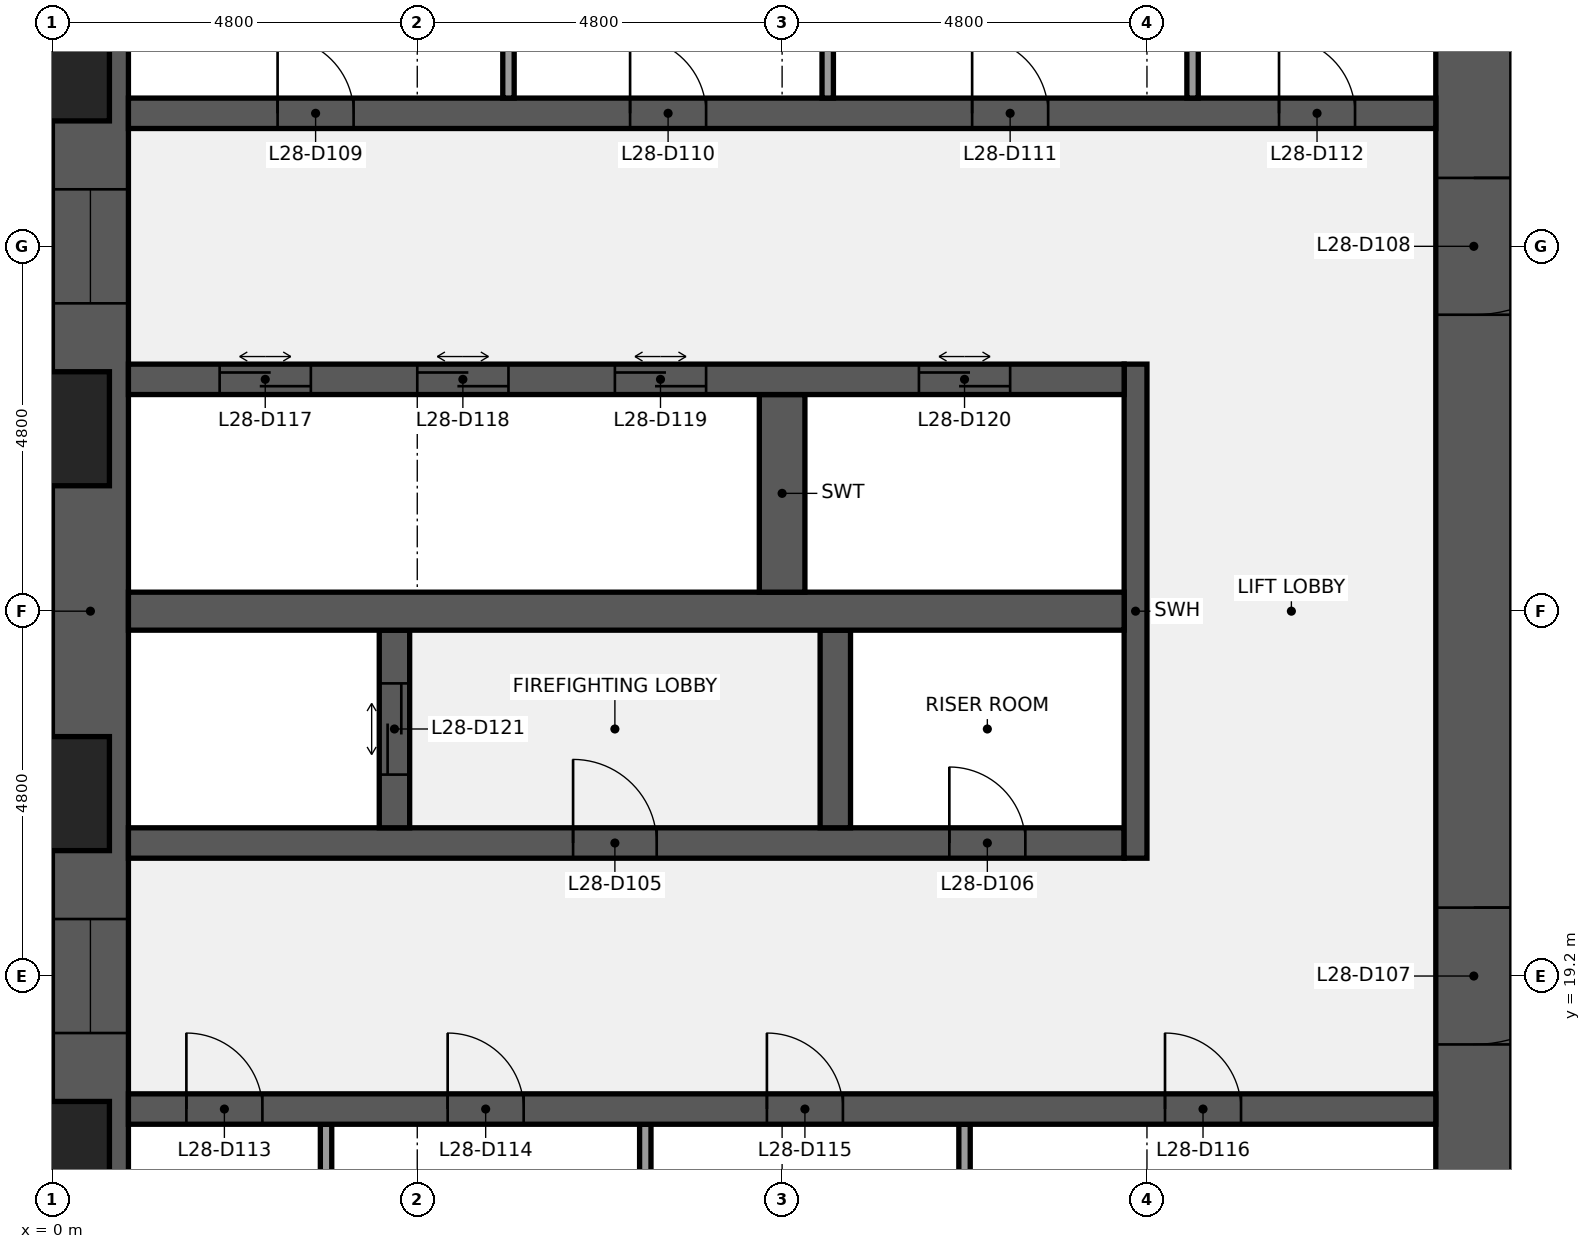
"""IFC4 building model, lengths in metres.
Left out: names, types, materials, properties, quantities, classifications, styles, units other than length and angle.
Written with IfcOpenShell. Run it as: python <this file> out.ifc"""

import sys

from ifc_helpers import new_model, si_unit, direction, frame, frame_2d, origin, place, context, subcontext, project, spatial, rectangle, extrude, element, fill, save


model = new_model("IFC4")
c1 = context("Model", 3, precision=1e-05, world=origin(), true_north=direction((0.0, 1.0)))
c2 = subcontext(c1, "Body", "Model", "MODEL_VIEW")
j1 = project(units=[si_unit("LENGTHUNIT", "METRE"), si_unit("PLANEANGLEUNIT", "RADIAN")], contexts=[c1])
p1 = place(None, origin())
s1 = spatial("IfcSite", under=j1, at=p1, CompositionType="ELEMENT")
p2 = place(p1, origin())
s2 = spatial("IfcBuilding", under=s1, at=p2, CompositionType="ELEMENT")
p3 = place(p2, frame((0.0, 0.0, 132.1)))
s3 = spatial("IfcBuildingStorey", under=s2, at=p3, CompositionType="ELEMENT", Elevation=132.1)
p4 = place(p3, frame((0.5, 9.6, 0.0), z_axis=(0.0, 0.0, 1.0), x_axis=(0.0, 1.0, 0.0)))
e1 = element("IfcWall", 1, at=p4, inside=s3, PredefinedType="SHEAR", context=c2, shape_type="SweptSolid", body=[
    extrude(rectangle(XDim=28.8, YDim=1.0, at=frame_2d((14.4, 0.0))), origin(), (0.0, 0.0, 1.0), 3.84),
])
p5 = place(p4, frame((8.85, 0.0, 0.9)))
e2 = element("IfcOpeningElement", 2, at=p5, cuts=e1, PredefinedType="OPENING", context=c2, shape_type="SweptSolid", body=[
    extrude(rectangle(XDim=1.5, YDim=1.5, at=frame_2d((0.75, 0.75))), frame((0.0, 0.51, 0.0), z_axis=(0.0, -1.0, 0.0), x_axis=(1.0, 0.0, 0.0)), (0.0, 0.0, 1.0), 1.02),
])
p6 = place(p4, frame((18.45, 0.0, 0.9)))
e3 = element("IfcOpeningElement", 3, at=p6, cuts=e1, PredefinedType="OPENING", context=c2, shape_type="SweptSolid", body=[
    extrude(rectangle(XDim=1.5, YDim=1.5, at=frame_2d((0.75, 0.75))), frame((0.0, 0.51, 0.0), z_axis=(0.0, -1.0, 0.0), x_axis=(1.0, 0.0, 0.0)), (0.0, 0.0, 1.0), 1.02),
])
p7 = place(p3, frame((18.7, 38.4, 0.0), z_axis=(0.0, 0.0, 1.0), x_axis=(0.0, -1.0, 0.0)))
e4 = element("IfcWall", 4, at=p7, inside=s3, PredefinedType="SHEAR", context=c2, shape_type="SweptSolid", body=[
    extrude(rectangle(XDim=28.8, YDim=1.0, at=frame_2d((14.4, 0.0))), origin(), (0.0, 0.0, 1.0), 3.84),
])
p8 = place(p7, frame((18.3, 0.0, 0.0)))
e5 = element("IfcOpeningElement", 5, at=p8, cuts=e4, PredefinedType="OPENING", context=c2, shape_type="SweptSolid", body=[
    extrude(rectangle(XDim=1.8, YDim=2.1, at=frame_2d((0.9, 1.05))), frame((0.0, 0.51, 0.0), z_axis=(0.0, -1.0, 0.0), x_axis=(1.0, 0.0, 0.0)), (0.0, 0.0, 1.0), 1.02),
])
p9 = place(p7, frame((8.7, 0.0, 0.0)))
e6 = element("IfcOpeningElement", 6, at=p9, cuts=e4, PredefinedType="OPENING", context=c2, shape_type="SweptSolid", body=[
    extrude(rectangle(XDim=1.8, YDim=2.1, at=frame_2d((0.9, 1.05))), frame((0.0, 0.51, 0.0), z_axis=(0.0, -1.0, 0.0), x_axis=(1.0, 0.0, 0.0)), (0.0, 0.0, 1.0), 1.02),
])
for number, where, z_axis, x_axis in (
    (7, (3.6, 14.65, 0.0), (0.0, 0.0, 1.0), (0.0, 1.0, 0.0)),
    (8, (7.8, 14.65, 0.0), (0.0, 0.0, 1.0), (0.0, 1.0, 0.0)),
    (9, (12.0, 14.65, 0.0), (0.0, 0.0, 1.0), (0.0, 1.0, 0.0)),
):
    element("IfcWall", number, at=place(p3, frame(where, z_axis=z_axis, x_axis=x_axis)), inside=s3, PredefinedType="PARTITIONING", context=c2, shape_type="SweptSolid", body=[
        extrude(rectangle(XDim=2.6, YDim=0.15, at=frame_2d((1.3, 0.0))), origin(), (0.0, 0.0, 1.0), 3.84),
    ])
p10 = place(p3, frame((1.0, 17.45, 0.0), z_axis=(0.0, 0.0, 1.0), x_axis=(1.0, 0.0, 0.0)))
e10 = element("IfcWall", 10, at=p10, inside=s3, PredefinedType="SHEAR", context=c2, shape_type="SweptSolid", body=[
    extrude(rectangle(XDim=17.2, YDim=0.4, at=frame_2d((8.6, 0.0))), origin(), (0.0, 0.0, 1.0), 3.84),
])
p11 = place(p10, frame((0.762, 0.0, 0.0)))
e11 = element("IfcOpeningElement", 11, at=p11, cuts=e10, PredefinedType="OPENING", context=c2, shape_type="SweptSolid", body=[
    extrude(rectangle(XDim=1.0, YDim=2.1, at=frame_2d((0.5, 1.05))), frame((0.0, 0.21, 0.0), z_axis=(0.0, -1.0, 0.0), x_axis=(1.0, 0.0, 0.0)), (0.0, 0.0, 1.0), 0.42),
])
p12 = place(p10, frame((4.2, 0.0, 0.0)))
e12 = element("IfcOpeningElement", 12, at=p12, cuts=e10, PredefinedType="OPENING", context=c2, shape_type="SweptSolid", body=[
    extrude(rectangle(XDim=1.0, YDim=2.1, at=frame_2d((0.5, 1.05))), frame((0.0, 0.21, 0.0), z_axis=(0.0, -1.0, 0.0), x_axis=(1.0, 0.0, 0.0)), (0.0, 0.0, 1.0), 0.42),
])
p13 = place(p10, frame((8.4, 0.0, 0.0)))
e13 = element("IfcOpeningElement", 13, at=p13, cuts=e10, PredefinedType="OPENING", context=c2, shape_type="SweptSolid", body=[
    extrude(rectangle(XDim=1.0, YDim=2.1, at=frame_2d((0.5, 1.05))), frame((0.0, 0.21, 0.0), z_axis=(0.0, -1.0, 0.0), x_axis=(1.0, 0.0, 0.0)), (0.0, 0.0, 1.0), 0.42),
])
p14 = place(p10, frame((13.637, 0.0, 0.0)))
e14 = element("IfcOpeningElement", 14, at=p14, cuts=e10, PredefinedType="OPENING", context=c2, shape_type="SweptSolid", body=[
    extrude(rectangle(XDim=1.0, YDim=2.1, at=frame_2d((0.5, 1.05))), frame((0.0, 0.21, 0.0), z_axis=(0.0, -1.0, 0.0), x_axis=(1.0, 0.0, 0.0)), (0.0, 0.0, 1.0), 0.42),
])
p15 = place(p3, frame((1.0, 20.95, 0.0), z_axis=(0.0, 0.0, 1.0), x_axis=(1.0, 0.0, 0.0)))
e15 = element("IfcWall", 15, at=p15, inside=s3, PredefinedType="SHEAR", context=c2, shape_type="SweptSolid", body=[
    extrude(rectangle(XDim=13.1, YDim=0.4, at=frame_2d((6.55, 0.0))), origin(), (0.0, 0.0, 1.0), 3.84),
])
p16 = place(p15, frame((5.85, 0.0, 0.0)))
e16 = element("IfcOpeningElement", 16, at=p16, cuts=e15, PredefinedType="OPENING", context=c2, shape_type="SweptSolid", body=[
    extrude(rectangle(XDim=1.1, YDim=2.1, at=frame_2d((0.55, 1.05))), frame((0.0, 0.21, 0.0), z_axis=(0.0, -1.0, 0.0), x_axis=(1.0, 0.0, 0.0)), (0.0, 0.0, 1.0), 0.42),
])
p17 = place(p15, frame((10.8, 0.0, 0.0)))
e17 = element("IfcOpeningElement", 17, at=p17, cuts=e15, PredefinedType="OPENING", context=c2, shape_type="SweptSolid", body=[
    extrude(rectangle(XDim=1.0, YDim=2.1, at=frame_2d((0.5, 1.05))), frame((0.0, 0.21, 0.0), z_axis=(0.0, -1.0, 0.0), x_axis=(1.0, 0.0, 0.0)), (0.0, 0.0, 1.0), 0.42),
])
p18 = place(p3, frame((14.25, 20.75, 0.0), z_axis=(0.0, 0.0, 1.0), x_axis=(0.0, 1.0, 0.0)))
e18 = element("IfcWall", 18, at=p18, inside=s3, PredefinedType="SHEAR", context=c2, shape_type="SweptSolid", body=[
    extrude(rectangle(XDim=6.5, YDim=0.3, at=frame_2d((3.25, 0.0))), origin(), (0.0, 0.0, 1.0), 3.84),
])
p19 = place(p3, frame((4.5, 21.15, 0.0), z_axis=(0.0, 0.0, 1.0), x_axis=(0.0, 1.0, 0.0)))
e19 = element("IfcWall", 19, at=p19, inside=s3, PredefinedType="SHEAR", context=c2, shape_type="SweptSolid", body=[
    extrude(rectangle(XDim=2.6, YDim=0.4, at=frame_2d((1.3, 0.0))), origin(), (0.0, 0.0, 1.0), 3.84),
])
p20 = place(p19, frame((0.7, 0.0, 0.0)))
e20 = element("IfcOpeningElement", 20, at=p20, cuts=e19, PredefinedType="OPENING", context=c2, shape_type="SweptSolid", body=[
    extrude(rectangle(XDim=1.2, YDim=2.1, at=frame_2d((0.6, 1.05))), frame((0.0, 0.21, 0.0), z_axis=(0.0, -1.0, 0.0), x_axis=(1.0, 0.0, 0.0)), (0.0, 0.0, 1.0), 0.42),
])
p21 = place(p3, frame((10.3, 21.15, 0.0), z_axis=(0.0, 0.0, 1.0), x_axis=(0.0, 1.0, 0.0)))
e21 = element("IfcWall", 21, at=p21, inside=s3, PredefinedType="SHEAR", context=c2, shape_type="SweptSolid", body=[
    extrude(rectangle(XDim=2.6, YDim=0.4, at=frame_2d((1.3, 0.0))), origin(), (0.0, 0.0, 1.0), 3.84),
])
p22 = place(p3, frame((1.0, 24.0, 0.0), z_axis=(0.0, 0.0, 1.0), x_axis=(1.0, 0.0, 0.0)))
e22 = element("IfcWall", 22, at=p22, inside=s3, PredefinedType="SHEAR", context=c2, shape_type="SweptSolid", body=[
    extrude(rectangle(XDim=13.1, YDim=0.5, at=frame_2d((6.55, 0.0))), origin(), (0.0, 0.0, 1.0), 3.84),
])
p23 = place(p3, frame((9.6, 24.25, 0.0), z_axis=(0.0, 0.0, 1.0), x_axis=(0.0, 1.0, 0.0)))
e23 = element("IfcWall", 23, at=p23, inside=s3, PredefinedType="SHEAR", context=c2, shape_type="SweptSolid", body=[
    extrude(rectangle(XDim=2.6, YDim=0.6, at=frame_2d((1.3, 0.0))), origin(), (0.0, 0.0, 1.0), 3.84),
])
p24 = place(p3, frame((1.0, 27.05, 0.0), z_axis=(0.0, 0.0, 1.0), x_axis=(1.0, 0.0, 0.0)))
e24 = element("IfcWall", 24, at=p24, inside=s3, PredefinedType="SHEAR", context=c2, shape_type="SweptSolid", body=[
    extrude(rectangle(XDim=13.1, YDim=0.4, at=frame_2d((6.55, 0.0))), origin(), (0.0, 0.0, 1.0), 3.84),
])
p25 = place(p24, frame((1.2, 0.0, 0.0)))
e25 = element("IfcOpeningElement", 25, at=p25, cuts=e24, PredefinedType="OPENING", context=c2, shape_type="SweptSolid", body=[
    extrude(rectangle(XDim=1.2, YDim=2.1, at=frame_2d((0.6, 1.05))), frame((0.0, 0.21, 0.0), z_axis=(0.0, -1.0, 0.0), x_axis=(1.0, 0.0, 0.0)), (0.0, 0.0, 1.0), 0.42),
])
p26 = place(p24, frame((3.8, 0.0, 0.0)))
e26 = element("IfcOpeningElement", 26, at=p26, cuts=e24, PredefinedType="OPENING", context=c2, shape_type="SweptSolid", body=[
    extrude(rectangle(XDim=1.2, YDim=2.1, at=frame_2d((0.6, 1.05))), frame((0.0, 0.21, 0.0), z_axis=(0.0, -1.0, 0.0), x_axis=(1.0, 0.0, 0.0)), (0.0, 0.0, 1.0), 0.42),
])
p27 = place(p24, frame((6.4, 0.0, 0.0)))
e27 = element("IfcOpeningElement", 27, at=p27, cuts=e24, PredefinedType="OPENING", context=c2, shape_type="SweptSolid", body=[
    extrude(rectangle(XDim=1.2, YDim=2.1, at=frame_2d((0.6, 1.05))), frame((0.0, 0.21, 0.0), z_axis=(0.0, -1.0, 0.0), x_axis=(1.0, 0.0, 0.0)), (0.0, 0.0, 1.0), 0.42),
])
p28 = place(p24, frame((10.4, 0.0, 0.0)))
e28 = element("IfcOpeningElement", 28, at=p28, cuts=e24, PredefinedType="OPENING", context=c2, shape_type="SweptSolid", body=[
    extrude(rectangle(XDim=1.2, YDim=2.1, at=frame_2d((0.6, 1.05))), frame((0.0, 0.21, 0.0), z_axis=(0.0, -1.0, 0.0), x_axis=(1.0, 0.0, 0.0)), (0.0, 0.0, 1.0), 0.42),
])
p29 = place(p3, frame((1.0, 30.55, 0.0), z_axis=(0.0, 0.0, 1.0), x_axis=(1.0, 0.0, 0.0)))
e29 = element("IfcWall", 29, at=p29, inside=s3, PredefinedType="SHEAR", context=c2, shape_type="SweptSolid", body=[
    extrude(rectangle(XDim=17.2, YDim=0.4, at=frame_2d((8.6, 0.0))), origin(), (0.0, 0.0, 1.0), 3.84),
])
p30 = place(p29, frame((1.962, 0.0, 0.0)))
e30 = element("IfcOpeningElement", 30, at=p30, cuts=e29, PredefinedType="OPENING", context=c2, shape_type="SweptSolid", body=[
    extrude(rectangle(XDim=1.0, YDim=2.1, at=frame_2d((0.5, 1.05))), frame((0.0, 0.21, 0.0), z_axis=(0.0, -1.0, 0.0), x_axis=(1.0, 0.0, 0.0)), (0.0, 0.0, 1.0), 0.42),
])
p31 = place(p29, frame((6.6, 0.0, 0.0)))
e31 = element("IfcOpeningElement", 31, at=p31, cuts=e29, PredefinedType="OPENING", context=c2, shape_type="SweptSolid", body=[
    extrude(rectangle(XDim=1.0, YDim=2.1, at=frame_2d((0.5, 1.05))), frame((0.0, 0.21, 0.0), z_axis=(0.0, -1.0, 0.0), x_axis=(1.0, 0.0, 0.0)), (0.0, 0.0, 1.0), 0.42),
])
p32 = place(p29, frame((11.1, 0.0, 0.0)))
e32 = element("IfcOpeningElement", 32, at=p32, cuts=e29, PredefinedType="OPENING", context=c2, shape_type="SweptSolid", body=[
    extrude(rectangle(XDim=1.0, YDim=2.1, at=frame_2d((0.5, 1.05))), frame((0.0, 0.21, 0.0), z_axis=(0.0, -1.0, 0.0), x_axis=(1.0, 0.0, 0.0)), (0.0, 0.0, 1.0), 0.42),
])
p33 = place(p29, frame((15.137, 0.0, 0.0)))
e33 = element("IfcOpeningElement", 33, at=p33, cuts=e29, PredefinedType="OPENING", context=c2, shape_type="SweptSolid", body=[
    extrude(rectangle(XDim=1.0, YDim=2.1, at=frame_2d((0.5, 1.05))), frame((0.0, 0.21, 0.0), z_axis=(0.0, -1.0, 0.0), x_axis=(1.0, 0.0, 0.0)), (0.0, 0.0, 1.0), 0.42),
])
for number, where, z_axis, x_axis in (
    (34, (6.0, 30.75, 0.0), (0.0, 0.0, 1.0), (0.0, 1.0, 0.0)),
    (35, (10.2, 30.75, 0.0), (0.0, 0.0, 1.0), (0.0, 1.0, 0.0)),
    (36, (15.0, 30.75, 0.0), (0.0, 0.0, 1.0), (0.0, 1.0, 0.0)),
):
    element("IfcWall", number, at=place(p3, frame(where, z_axis=z_axis, x_axis=x_axis)), inside=s3, PredefinedType="PARTITIONING", context=c2, shape_type="SweptSolid", body=[
        extrude(rectangle(XDim=2.6, YDim=0.15, at=frame_2d((1.3, 0.0))), origin(), (0.0, 0.0, 1.0), 3.84),
    ])
p34 = place(p16, origin())
e37 = element("IfcDoor", 37, at=p34, inside=s3, OperationType="SINGLE_SWING_LEFT", PredefinedType="DOOR", context=c2, shape_type="SweptSolid", body=[
    extrude(rectangle(XDim=1.1, YDim=2.1, at=frame_2d((0.55, 1.05))), frame((0.0, 0.025, 0.0), z_axis=(0.0, -1.0, 0.0), x_axis=(1.0, 0.0, 0.0)), (0.0, 0.0, 1.0), 0.05),
])
fill(e16, e37)
p35 = place(p17, origin())
e38 = element("IfcDoor", 38, at=p35, inside=s3, OperationType="SINGLE_SWING_LEFT", PredefinedType="DOOR", context=c2, shape_type="SweptSolid", body=[
    extrude(rectangle(XDim=1.0, YDim=2.1, at=frame_2d((0.5, 1.05))), frame((0.0, 0.025, 0.0), z_axis=(0.0, -1.0, 0.0), x_axis=(1.0, 0.0, 0.0)), (0.0, 0.0, 1.0), 0.05),
])
fill(e17, e38)
p36 = place(p8, origin())
e39 = element("IfcDoor", 39, at=p36, inside=s3, OperationType="DOUBLE_DOOR_SINGLE_SWING", PredefinedType="DOOR", context=c2, shape_type="SweptSolid", body=[
    extrude(rectangle(XDim=1.8, YDim=2.1, at=frame_2d((0.9, 1.05))), frame((0.0, 0.025, 0.0), z_axis=(0.0, -1.0, 0.0), x_axis=(1.0, 0.0, 0.0)), (0.0, 0.0, 1.0), 0.05),
])
fill(e5, e39)
p37 = place(p9, origin())
e40 = element("IfcDoor", 40, at=p37, inside=s3, OperationType="DOUBLE_DOOR_SINGLE_SWING", PredefinedType="DOOR", context=c2, shape_type="SweptSolid", body=[
    extrude(rectangle(XDim=1.8, YDim=2.1, at=frame_2d((0.9, 1.05))), frame((0.0, 0.025, 0.0), z_axis=(0.0, -1.0, 0.0), x_axis=(1.0, 0.0, 0.0)), (0.0, 0.0, 1.0), 0.05),
])
fill(e6, e40)
p38 = place(p30, origin())
e41 = element("IfcDoor", 41, at=p38, inside=s3, OperationType="SINGLE_SWING_LEFT", PredefinedType="DOOR", context=c2, shape_type="SweptSolid", body=[
    extrude(rectangle(XDim=1.0, YDim=2.1, at=frame_2d((0.5, 1.05))), frame((0.0, 0.025, 0.0), z_axis=(0.0, -1.0, 0.0), x_axis=(1.0, 0.0, 0.0)), (0.0, 0.0, 1.0), 0.05),
])
fill(e30, e41)
p39 = place(p31, origin())
e42 = element("IfcDoor", 42, at=p39, inside=s3, OperationType="SINGLE_SWING_LEFT", PredefinedType="DOOR", context=c2, shape_type="SweptSolid", body=[
    extrude(rectangle(XDim=1.0, YDim=2.1, at=frame_2d((0.5, 1.05))), frame((0.0, 0.025, 0.0), z_axis=(0.0, -1.0, 0.0), x_axis=(1.0, 0.0, 0.0)), (0.0, 0.0, 1.0), 0.05),
])
fill(e31, e42)
p40 = place(p32, origin())
e43 = element("IfcDoor", 43, at=p40, inside=s3, OperationType="SINGLE_SWING_LEFT", PredefinedType="DOOR", context=c2, shape_type="SweptSolid", body=[
    extrude(rectangle(XDim=1.0, YDim=2.1, at=frame_2d((0.5, 1.05))), frame((0.0, 0.025, 0.0), z_axis=(0.0, -1.0, 0.0), x_axis=(1.0, 0.0, 0.0)), (0.0, 0.0, 1.0), 0.05),
])
fill(e32, e43)
p41 = place(p33, origin())
e44 = element("IfcDoor", 44, at=p41, inside=s3, OperationType="SINGLE_SWING_LEFT", PredefinedType="DOOR", context=c2, shape_type="SweptSolid", body=[
    extrude(rectangle(XDim=1.0, YDim=2.1, at=frame_2d((0.5, 1.05))), frame((0.0, 0.025, 0.0), z_axis=(0.0, -1.0, 0.0), x_axis=(1.0, 0.0, 0.0)), (0.0, 0.0, 1.0), 0.05),
])
fill(e33, e44)
p42 = place(p11, origin())
e45 = element("IfcDoor", 45, at=p42, inside=s3, OperationType="SINGLE_SWING_LEFT", PredefinedType="DOOR", context=c2, shape_type="SweptSolid", body=[
    extrude(rectangle(XDim=1.0, YDim=2.1, at=frame_2d((0.5, 1.05))), frame((0.0, 0.025, 0.0), z_axis=(0.0, -1.0, 0.0), x_axis=(1.0, 0.0, 0.0)), (0.0, 0.0, 1.0), 0.05),
])
fill(e11, e45)
p43 = place(p12, origin())
e46 = element("IfcDoor", 46, at=p43, inside=s3, OperationType="SINGLE_SWING_LEFT", PredefinedType="DOOR", context=c2, shape_type="SweptSolid", body=[
    extrude(rectangle(XDim=1.0, YDim=2.1, at=frame_2d((0.5, 1.05))), frame((0.0, 0.025, 0.0), z_axis=(0.0, -1.0, 0.0), x_axis=(1.0, 0.0, 0.0)), (0.0, 0.0, 1.0), 0.05),
])
fill(e12, e46)
p44 = place(p13, origin())
e47 = element("IfcDoor", 47, at=p44, inside=s3, OperationType="SINGLE_SWING_LEFT", PredefinedType="DOOR", context=c2, shape_type="SweptSolid", body=[
    extrude(rectangle(XDim=1.0, YDim=2.1, at=frame_2d((0.5, 1.05))), frame((0.0, 0.025, 0.0), z_axis=(0.0, -1.0, 0.0), x_axis=(1.0, 0.0, 0.0)), (0.0, 0.0, 1.0), 0.05),
])
fill(e13, e47)
p45 = place(p14, origin())
e48 = element("IfcDoor", 48, at=p45, inside=s3, OperationType="SINGLE_SWING_LEFT", PredefinedType="DOOR", context=c2, shape_type="SweptSolid", body=[
    extrude(rectangle(XDim=1.0, YDim=2.1, at=frame_2d((0.5, 1.05))), frame((0.0, 0.025, 0.0), z_axis=(0.0, -1.0, 0.0), x_axis=(1.0, 0.0, 0.0)), (0.0, 0.0, 1.0), 0.05),
])
fill(e14, e48)
p46 = place(p25, origin())
e49 = element("IfcDoor", 49, at=p46, inside=s3, OperationType="DOUBLE_DOOR_SLIDING", PredefinedType="DOOR", context=c2, shape_type="SweptSolid", body=[
    extrude(rectangle(XDim=1.2, YDim=2.1, at=frame_2d((0.6, 1.05))), frame((0.0, 0.025, 0.0), z_axis=(0.0, -1.0, 0.0), x_axis=(1.0, 0.0, 0.0)), (0.0, 0.0, 1.0), 0.05),
])
fill(e25, e49)
p47 = place(p26, origin())
e50 = element("IfcDoor", 50, at=p47, inside=s3, OperationType="DOUBLE_DOOR_SLIDING", PredefinedType="DOOR", context=c2, shape_type="SweptSolid", body=[
    extrude(rectangle(XDim=1.2, YDim=2.1, at=frame_2d((0.6, 1.05))), frame((0.0, 0.025, 0.0), z_axis=(0.0, -1.0, 0.0), x_axis=(1.0, 0.0, 0.0)), (0.0, 0.0, 1.0), 0.05),
])
fill(e26, e50)
p48 = place(p27, origin())
e51 = element("IfcDoor", 51, at=p48, inside=s3, OperationType="DOUBLE_DOOR_SLIDING", PredefinedType="DOOR", context=c2, shape_type="SweptSolid", body=[
    extrude(rectangle(XDim=1.2, YDim=2.1, at=frame_2d((0.6, 1.05))), frame((0.0, 0.025, 0.0), z_axis=(0.0, -1.0, 0.0), x_axis=(1.0, 0.0, 0.0)), (0.0, 0.0, 1.0), 0.05),
])
fill(e27, e51)
p49 = place(p28, origin())
e52 = element("IfcDoor", 52, at=p49, inside=s3, OperationType="DOUBLE_DOOR_SLIDING", PredefinedType="DOOR", context=c2, shape_type="SweptSolid", body=[
    extrude(rectangle(XDim=1.2, YDim=2.1, at=frame_2d((0.6, 1.05))), frame((0.0, 0.025, 0.0), z_axis=(0.0, -1.0, 0.0), x_axis=(1.0, 0.0, 0.0)), (0.0, 0.0, 1.0), 0.05),
])
fill(e28, e52)
p50 = place(p20, origin())
e53 = element("IfcDoor", 53, at=p50, inside=s3, OperationType="DOUBLE_DOOR_SLIDING", PredefinedType="DOOR", context=c2, shape_type="SweptSolid", body=[
    extrude(rectangle(XDim=1.2, YDim=2.1, at=frame_2d((0.6, 1.05))), frame((0.0, 0.025, 0.0), z_axis=(0.0, -1.0, 0.0), x_axis=(1.0, 0.0, 0.0)), (0.0, 0.0, 1.0), 0.05),
])
fill(e20, e53)
p51 = place(p5, origin())
e54 = element("IfcWindow", 54, at=p51, inside=s3, PartitioningType="SINGLE_PANEL", PredefinedType="WINDOW", context=c2, shape_type="SweptSolid", body=[
    extrude(rectangle(XDim=1.5, YDim=1.5, at=frame_2d((0.75, 0.75))), frame((0.0, 0.03, 0.0), z_axis=(0.0, -1.0, 0.0), x_axis=(1.0, 0.0, 0.0)), (0.0, 0.0, 1.0), 0.06),
])
fill(e2, e54)
p52 = place(p6, origin())
e55 = element("IfcWindow", 55, at=p52, inside=s3, PartitioningType="SINGLE_PANEL", PredefinedType="WINDOW", context=c2, shape_type="SweptSolid", body=[
    extrude(rectangle(XDim=1.5, YDim=1.5, at=frame_2d((0.75, 0.75))), frame((0.0, 0.03, 0.0), z_axis=(0.0, -1.0, 0.0), x_axis=(1.0, 0.0, 0.0)), (0.0, 0.0, 1.0), 0.06),
])
fill(e3, e55)
save(model, sys.argv[1])
